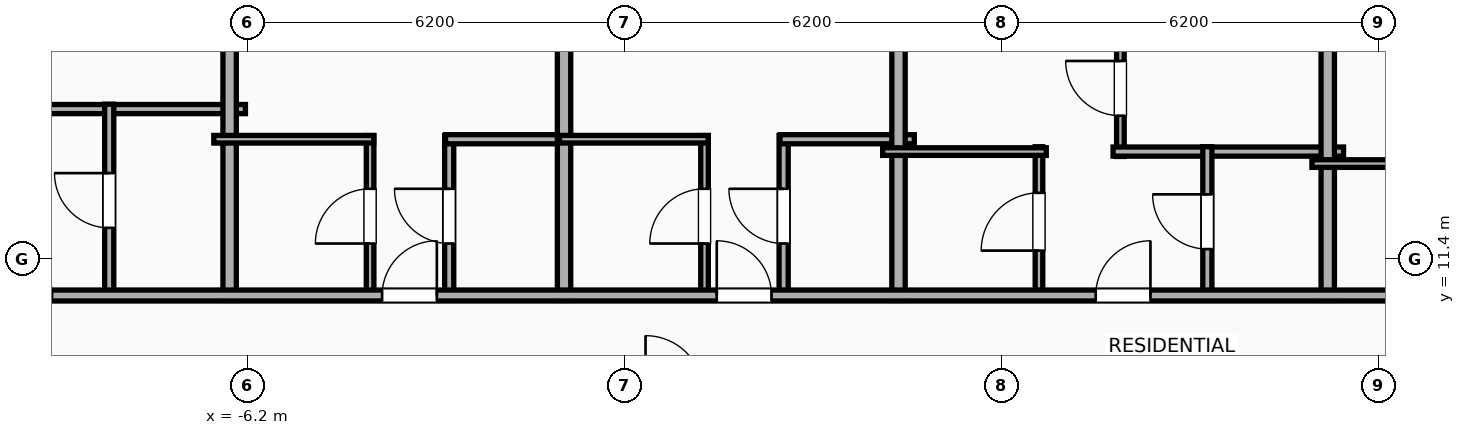
"""IFC4 building model, lengths in metres.
Left out: names, types, materials, properties, quantities, classifications, styles, units other than length and angle.
Written with IfcOpenShell. Run it as: python <this file> out.ifc"""

import sys

from ifc_helpers import new_model, si_unit, direction, frame, frame_2d, origin, place, context, subcontext, project, spatial, rectangle, extrude, element, fill, save


model = new_model("IFC4")
c1 = context("Model", 3, precision=1e-05, world=origin(), true_north=direction((0.0, 1.0)))
c2 = subcontext(c1, "Body", "Model", "MODEL_VIEW")
j1 = project(units=[si_unit("LENGTHUNIT", "METRE"), si_unit("PLANEANGLEUNIT", "RADIAN")], contexts=[c1])
p1 = place(None, origin())
s1 = spatial("IfcSite", under=j1, at=p1, CompositionType="ELEMENT")
p2 = place(p1, origin())
s2 = spatial("IfcBuilding", under=s1, at=p2, CompositionType="ELEMENT")
p3 = place(p2, frame((0.0, 0.0, 279.5)))
s3 = spatial("IfcBuildingStorey", under=s2, at=p3, CompositionType="ELEMENT", Elevation=279.5)
p4 = place(p3, frame((-10.03, 13.866, 0.0), z_axis=(0.0, 0.0, 1.0), x_axis=(1.0, 0.0, 0.0)))
e1 = element("IfcWall", 1, at=p4, inside=s3, PredefinedType="PLUMBINGWALL", context=c2, shape_type="SweptSolid", body=[
    extrude(rectangle(XDim=3.79, YDim=0.15, at=frame_2d((1.895, 0.0))), origin(), (0.0, 0.0, 1.0), 3.65),
])
p5 = place(p3, frame((-8.48, 10.78, 0.0), z_axis=(0.0, 0.0, 1.0), x_axis=(0.0, 1.0, 0.0)))
e2 = element("IfcWall", 2, at=p5, inside=s3, PredefinedType="PLUMBINGWALL", context=c2, shape_type="SweptSolid", body=[
    extrude(rectangle(XDim=3.166, YDim=0.15, at=frame_2d((1.583, 0.0))), origin(), (0.0, 0.0, 1.0), 3.65),
])
p6 = place(p5, frame((1.133, 0.0, 0.0)))
e3 = element("IfcOpeningElement", 3, at=p6, cuts=e2, PredefinedType="OPENING", context=c2, shape_type="SweptSolid", body=[
    extrude(rectangle(XDim=0.9, YDim=2.05, at=frame_2d((0.45, 1.025))), frame((0.0, 0.085, 0.0), z_axis=(0.0, -1.0, 0.0), x_axis=(1.0, 0.0, 0.0)), (0.0, 0.0, 1.0), 0.17),
])
p7 = place(p3, frame((-6.5, 10.72, 0.0), z_axis=(0.0, 0.0, 1.0), x_axis=(0.0, 1.0, 0.0)))
e4 = element("IfcWall", 4, at=p7, inside=s3, PredefinedType="PARTITIONING", context=c2, shape_type="SweptSolid", body=[
    extrude(rectangle(XDim=8.423, YDim=0.22, at=frame_2d((4.211, 0.0))), origin(), (0.0, 0.0, 1.0), 3.65),
])
p8 = place(p3, frame((-4.19, 10.78, 0.0), z_axis=(0.0, 0.0, 1.0), x_axis=(0.0, 1.0, 0.0)))
e5 = element("IfcWall", 5, at=p8, inside=s3, PredefinedType="PARTITIONING", context=c2, shape_type="SweptSolid", body=[
    extrude(rectangle(XDim=2.65, YDim=0.125, at=frame_2d((1.325, 0.0))), origin(), (0.0, 0.0, 1.0), 3.65),
])
p9 = place(p8, frame((0.875, 0.0, 0.0)))
e6 = element("IfcOpeningElement", 6, at=p9, cuts=e5, PredefinedType="OPENING", context=c2, shape_type="SweptSolid", body=[
    extrude(rectangle(XDim=0.9, YDim=2.05, at=frame_2d((0.45, 1.025))), frame((0.0, 0.073, 0.0), z_axis=(0.0, -1.0, 0.0), x_axis=(1.0, 0.0, 0.0)), (0.0, 0.0, 1.0), 0.145),
])
p10 = place(p3, frame((-2.889, 10.78, 0.0), z_axis=(0.0, 0.0, 1.0), x_axis=(0.0, 1.0, 0.0)))
e7 = element("IfcWall", 7, at=p10, inside=s3, PredefinedType="PLUMBINGWALL", context=c2, shape_type="SweptSolid", body=[
    extrude(rectangle(XDim=2.65, YDim=0.15, at=frame_2d((1.325, 0.0))), origin(), (0.0, 0.0, 1.0), 3.65),
])
p11 = place(p10, frame((0.875, 0.0, 0.0)))
e8 = element("IfcOpeningElement", 8, at=p11, cuts=e7, PredefinedType="OPENING", context=c2, shape_type="SweptSolid", body=[
    extrude(rectangle(XDim=0.9, YDim=2.05, at=frame_2d((0.45, 1.025))), frame((0.0, 0.085, 0.0), z_axis=(0.0, -1.0, 0.0), x_axis=(1.0, 0.0, 0.0)), (0.0, 0.0, 1.0), 0.17),
])
p12 = place(p3, frame((-6.76, 13.37, 0.0), z_axis=(0.0, 0.0, 1.0), x_axis=(1.0, 0.0, 0.0)))
e9 = element("IfcWall", 9, at=p12, inside=s3, PredefinedType="PARTITIONING", context=c2, shape_type="SweptSolid", body=[
    extrude(rectangle(XDim=2.63, YDim=0.125, at=frame_2d((1.315, 0.0))), origin(), (0.0, 0.0, 1.0), 3.65),
])
p13 = place(p3, frame((-2.949, 13.37, 0.0), z_axis=(0.0, 0.0, 1.0), x_axis=(1.0, 0.0, 0.0)))
e10 = element("IfcWall", 10, at=p13, inside=s3, PredefinedType="PLUMBINGWALL", context=c2, shape_type="SweptSolid", body=[
    extrude(rectangle(XDim=2.024, YDim=0.15, at=frame_2d((1.012, 0.0))), origin(), (0.0, 0.0, 1.0), 3.65),
])
p14 = place(p3, frame((-1.0, 10.72, 0.0), z_axis=(0.0, 0.0, 1.0), x_axis=(0.0, 1.0, 0.0)))
e11 = element("IfcWall", 11, at=p14, inside=s3, PredefinedType="PARTITIONING", context=c2, shape_type="SweptSolid", body=[
    extrude(rectangle(XDim=7.844, YDim=0.22, at=frame_2d((3.922, 0.0))), origin(), (0.0, 0.0, 1.0), 3.65),
])
p15 = place(p3, frame((1.31, 10.78, 0.0), z_axis=(0.0, 0.0, 1.0), x_axis=(0.0, 1.0, 0.0)))
e12 = element("IfcWall", 12, at=p15, inside=s3, PredefinedType="PARTITIONING", context=c2, shape_type="SweptSolid", body=[
    extrude(rectangle(XDim=2.65, YDim=0.125, at=frame_2d((1.325, 0.0))), origin(), (0.0, 0.0, 1.0), 3.65),
])
p16 = place(p15, frame((0.875, 0.0, 0.0)))
e13 = element("IfcOpeningElement", 13, at=p16, cuts=e12, PredefinedType="OPENING", context=c2, shape_type="SweptSolid", body=[
    extrude(rectangle(XDim=0.9, YDim=2.05, at=frame_2d((0.45, 1.025))), frame((0.0, 0.073, 0.0), z_axis=(0.0, -1.0, 0.0), x_axis=(1.0, 0.0, 0.0)), (0.0, 0.0, 1.0), 0.145),
])
p17 = place(p3, frame((2.611, 10.78, 0.0), z_axis=(0.0, 0.0, 1.0), x_axis=(0.0, 1.0, 0.0)))
e14 = element("IfcWall", 14, at=p17, inside=s3, PredefinedType="PLUMBINGWALL", context=c2, shape_type="SweptSolid", body=[
    extrude(rectangle(XDim=2.65, YDim=0.15, at=frame_2d((1.325, 0.0))), origin(), (0.0, 0.0, 1.0), 3.65),
])
p18 = place(p17, frame((0.875, 0.0, 0.0)))
e15 = element("IfcOpeningElement", 15, at=p18, cuts=e14, PredefinedType="OPENING", context=c2, shape_type="SweptSolid", body=[
    extrude(rectangle(XDim=0.9, YDim=2.05, at=frame_2d((0.45, 1.025))), frame((0.0, 0.085, 0.0), z_axis=(0.0, -1.0, 0.0), x_axis=(1.0, 0.0, 0.0)), (0.0, 0.0, 1.0), 0.17),
])
p19 = place(p3, frame((-1.075, 13.37, 0.0), z_axis=(0.0, 0.0, 1.0), x_axis=(1.0, 0.0, 0.0)))
e16 = element("IfcWall", 16, at=p19, inside=s3, PredefinedType="PARTITIONING", context=c2, shape_type="SweptSolid", body=[
    extrude(rectangle(XDim=2.445, YDim=0.125, at=frame_2d((1.223, 0.0))), origin(), (0.0, 0.0, 1.0), 3.65),
])
p20 = place(p3, frame((2.551, 13.37, 0.0), z_axis=(0.0, 0.0, 1.0), x_axis=(1.0, 0.0, 0.0)))
e17 = element("IfcWall", 17, at=p20, inside=s3, PredefinedType="PLUMBINGWALL", context=c2, shape_type="SweptSolid", body=[
    extrude(rectangle(XDim=2.209, YDim=0.15, at=frame_2d((1.104, 0.0))), origin(), (0.0, 0.0, 1.0), 3.65),
])
p21 = place(p3, frame((4.5, 10.72, 0.0), z_axis=(0.0, 0.0, 1.0), x_axis=(0.0, 1.0, 0.0)))
e18 = element("IfcWall", 18, at=p21, inside=s3, PredefinedType="PARTITIONING", context=c2, shape_type="SweptSolid", body=[
    extrude(rectangle(XDim=7.266, YDim=0.22, at=frame_2d((3.633, 0.0))), origin(), (0.0, 0.0, 1.0), 3.65),
])
p22 = place(p3, frame((8.149, 13.087, 0.0), z_axis=(0.0, 0.0, 1.0), x_axis=(0.0, 1.0, 0.0)))
e19 = element("IfcWall", 19, at=p22, inside=s3, PredefinedType="PARTITIONING", context=c2, shape_type="SweptSolid", body=[
    extrude(rectangle(XDim=4.667, YDim=0.125, at=frame_2d((2.333, 0.0))), origin(), (0.0, 0.0, 1.0), 3.65),
])
p23 = place(p22, frame((0.67, 0.0, 0.0)))
e20 = element("IfcOpeningElement", 20, at=p23, cuts=e19, PredefinedType="OPENING", context=c2, shape_type="SweptSolid", body=[
    extrude(rectangle(XDim=0.9, YDim=2.05, at=frame_2d((0.45, 1.025))), frame((0.0, 0.073, 0.0), z_axis=(0.0, -1.0, 0.0), x_axis=(1.0, 0.0, 0.0)), (0.0, 0.0, 1.0), 0.145),
])
p24 = place(p3, frame((8.029, 13.167, 0.0), z_axis=(0.0, 0.0, 1.0), x_axis=(1.0, 0.0, 0.0)))
e21 = element("IfcWall", 21, at=p24, inside=s3, PredefinedType="PLUMBINGWALL", context=c2, shape_type="SweptSolid", body=[
    extrude(rectangle(XDim=3.79, YDim=0.15, at=frame_2d((1.895, 0.0))), origin(), (0.0, 0.0, 1.0), 3.65),
])
p25 = place(p3, frame((6.81, 10.78, 0.0), z_axis=(0.0, 0.0, 1.0), x_axis=(0.0, 1.0, 0.0)))
e22 = element("IfcWall", 22, at=p25, inside=s3, PredefinedType="PARTITIONING", context=c2, shape_type="SweptSolid", body=[
    extrude(rectangle(XDim=2.467, YDim=0.125, at=frame_2d((1.233, 0.0))), origin(), (0.0, 0.0, 1.0), 3.65),
])
p26 = place(p25, frame((0.759, 0.0, 0.0)))
e23 = element("IfcOpeningElement", 23, at=p26, cuts=e22, PredefinedType="OPENING", context=c2, shape_type="SweptSolid", body=[
    extrude(rectangle(XDim=0.95, YDim=2.05, at=frame_2d((0.475, 1.025))), frame((0.0, 0.073, 0.0), z_axis=(0.0, -1.0, 0.0), x_axis=(1.0, 0.0, 0.0)), (0.0, 0.0, 1.0), 0.145),
])
p27 = place(p3, frame((4.24, 13.167, 0.0), z_axis=(0.0, 0.0, 1.0), x_axis=(1.0, 0.0, 0.0)))
e24 = element("IfcWall", 24, at=p27, inside=s3, PredefinedType="PARTITIONING", context=c2, shape_type="SweptSolid", body=[
    extrude(rectangle(XDim=2.69, YDim=0.125, at=frame_2d((1.345, 0.0))), origin(), (0.0, 0.0, 1.0), 3.65),
])
p28 = place(p3, frame((9.579, 10.78, 0.0), z_axis=(0.0, 0.0, 1.0), x_axis=(0.0, 1.0, 0.0)))
e25 = element("IfcWall", 25, at=p28, inside=s3, PredefinedType="PLUMBINGWALL", context=c2, shape_type="SweptSolid", body=[
    extrude(rectangle(XDim=2.467, YDim=0.15, at=frame_2d((1.233, 0.0))), origin(), (0.0, 0.0, 1.0), 3.65),
])
p29 = place(p28, frame((0.783, 0.0, 0.0)))
e26 = element("IfcOpeningElement", 26, at=p29, cuts=e25, PredefinedType="OPENING", context=c2, shape_type="SweptSolid", body=[
    extrude(rectangle(XDim=0.9, YDim=2.05, at=frame_2d((0.45, 1.025))), frame((0.0, 0.085, 0.0), z_axis=(0.0, -1.0, 0.0), x_axis=(1.0, 0.0, 0.0)), (0.0, 0.0, 1.0), 0.17),
])
p30 = place(p3, frame((11.559, 10.72, 0.0), z_axis=(0.0, 0.0, 1.0), x_axis=(0.0, 1.0, 0.0)))
e27 = element("IfcWall", 27, at=p30, inside=s3, PredefinedType="PARTITIONING", context=c2, shape_type="SweptSolid", body=[
    extrude(rectangle(XDim=6.524, YDim=0.22, at=frame_2d((3.262, 0.0))), origin(), (0.0, 0.0, 1.0), 3.65),
])
p31 = place(p3, frame((11.299, 12.97, 0.0), z_axis=(0.0, 0.0, 1.0), x_axis=(1.0, 0.0, 0.0)))
e28 = element("IfcWall", 28, at=p31, inside=s3, PredefinedType="PARTITIONING", context=c2, shape_type="SweptSolid", body=[
    extrude(rectangle(XDim=2.69, YDim=0.125, at=frame_2d((1.345, 0.0))), origin(), (0.0, 0.0, 1.0), 3.65),
])
p32 = place(p3, frame((-28.443, 10.8, 0.0), z_axis=(0.0, 0.0, 1.0), x_axis=(1.0, 0.0, 0.0)))
e29 = element("IfcWall", 29, at=p32, inside=s3, PredefinedType="PARTITIONING", context=c2, shape_type="SweptSolid", body=[
    extrude(rectangle(XDim=53.956, YDim=0.18, at=frame_2d((26.978, 0.0))), origin(), (0.0, 0.0, 1.0), 3.65),
])
p33 = place(p32, frame((3.213, 0.0, 0.0)))
e30 = element("IfcOpeningElement", 30, at=p33, cuts=e29, PredefinedType="OPENING", context=c2, shape_type="SweptSolid", body=[
    extrude(rectangle(XDim=1.15, YDim=2.05, at=frame_2d((0.575, 1.025))), frame((0.0, 0.1, 0.0), z_axis=(0.0, -1.0, 0.0), x_axis=(1.0, 0.0, 0.0)), (0.0, 0.0, 1.0), 0.2),
])
p34 = place(p32, frame((10.556, 0.0, 0.0)))
e31 = element("IfcOpeningElement", 31, at=p34, cuts=e29, PredefinedType="OPENING", context=c2, shape_type="SweptSolid", body=[
    extrude(rectangle(XDim=1.15, YDim=2.05, at=frame_2d((0.575, 1.025))), frame((0.0, 0.1, 0.0), z_axis=(0.0, -1.0, 0.0), x_axis=(1.0, 0.0, 0.0)), (0.0, 0.0, 1.0), 0.2),
])
p35 = place(p32, frame((17.872, 0.0, 0.0)))
e32 = element("IfcOpeningElement", 32, at=p35, cuts=e29, PredefinedType="OPENING", context=c2, shape_type="SweptSolid", body=[
    extrude(rectangle(XDim=1.15, YDim=2.05, at=frame_2d((0.575, 1.025))), frame((0.0, 0.1, 0.0), z_axis=(0.0, -1.0, 0.0), x_axis=(1.0, 0.0, 0.0)), (0.0, 0.0, 1.0), 0.2),
])
p36 = place(p32, frame((24.45, 0.0, 0.0)))
e33 = element("IfcOpeningElement", 33, at=p36, cuts=e29, PredefinedType="OPENING", context=c2, shape_type="SweptSolid", body=[
    extrude(rectangle(XDim=0.9, YDim=2.05, at=frame_2d((0.45, 1.025))), frame((0.0, 0.1, 0.0), z_axis=(0.0, -1.0, 0.0), x_axis=(1.0, 0.0, 0.0)), (0.0, 0.0, 1.0), 0.2),
])
p37 = place(p32, frame((29.954, 0.0, 0.0)))
e34 = element("IfcOpeningElement", 34, at=p37, cuts=e29, PredefinedType="OPENING", context=c2, shape_type="SweptSolid", body=[
    extrude(rectangle(XDim=0.9, YDim=2.05, at=frame_2d((0.45, 1.025))), frame((0.0, 0.1, 0.0), z_axis=(0.0, -1.0, 0.0), x_axis=(1.0, 0.0, 0.0)), (0.0, 0.0, 1.0), 0.2),
])
p38 = place(p32, frame((36.186, 0.0, 0.0)))
e35 = element("IfcOpeningElement", 35, at=p38, cuts=e29, PredefinedType="OPENING", context=c2, shape_type="SweptSolid", body=[
    extrude(rectangle(XDim=0.9, YDim=2.05, at=frame_2d((0.45, 1.025))), frame((0.0, 0.1, 0.0), z_axis=(0.0, -1.0, 0.0), x_axis=(1.0, 0.0, 0.0)), (0.0, 0.0, 1.0), 0.2),
])
p39 = place(p32, frame((43.249, 0.0, 0.0)))
e36 = element("IfcOpeningElement", 36, at=p39, cuts=e29, PredefinedType="OPENING", context=c2, shape_type="SweptSolid", body=[
    extrude(rectangle(XDim=0.9, YDim=2.05, at=frame_2d((0.45, 1.025))), frame((0.0, 0.1, 0.0), z_axis=(0.0, -1.0, 0.0), x_axis=(1.0, 0.0, 0.0)), (0.0, 0.0, 1.0), 0.2),
])
p40 = place(p32, frame((50.311, 0.0, 0.0)))
e37 = element("IfcOpeningElement", 37, at=p40, cuts=e29, PredefinedType="OPENING", context=c2, shape_type="SweptSolid", body=[
    extrude(rectangle(XDim=0.9, YDim=2.05, at=frame_2d((0.45, 1.025))), frame((0.0, 0.1, 0.0), z_axis=(0.0, -1.0, 0.0), x_axis=(1.0, 0.0, 0.0)), (0.0, 0.0, 1.0), 0.2),
])
p41 = place(p6, origin())
e38 = element("IfcDoor", 38, at=p41, inside=s3, OperationType="SINGLE_SWING_RIGHT", PredefinedType="DOOR", context=c2, shape_type="SweptSolid", body=[
    extrude(rectangle(XDim=0.9, YDim=2.05, at=frame_2d((0.45, 1.025))), frame((0.0, 0.025, 0.0), z_axis=(0.0, -1.0, 0.0), x_axis=(1.0, 0.0, 0.0)), (0.0, 0.0, 1.0), 0.05),
])
fill(e3, e38)
p42 = place(p9, origin())
e39 = element("IfcDoor", 39, at=p42, inside=s3, OperationType="SINGLE_SWING_LEFT", PredefinedType="DOOR", context=c2, shape_type="SweptSolid", body=[
    extrude(rectangle(XDim=0.9, YDim=2.05, at=frame_2d((0.45, 1.025))), frame((0.0, 0.025, 0.0), z_axis=(0.0, -1.0, 0.0), x_axis=(1.0, 0.0, 0.0)), (0.0, 0.0, 1.0), 0.05),
])
fill(e6, e39)
p43 = place(p11, origin())
e40 = element("IfcDoor", 40, at=p43, inside=s3, OperationType="SINGLE_SWING_RIGHT", PredefinedType="DOOR", context=c2, shape_type="SweptSolid", body=[
    extrude(rectangle(XDim=0.9, YDim=2.05, at=frame_2d((0.45, 1.025))), frame((0.0, 0.025, 0.0), z_axis=(0.0, -1.0, 0.0), x_axis=(1.0, 0.0, 0.0)), (0.0, 0.0, 1.0), 0.05),
])
fill(e8, e40)
p44 = place(p16, origin())
e41 = element("IfcDoor", 41, at=p44, inside=s3, OperationType="SINGLE_SWING_LEFT", PredefinedType="DOOR", context=c2, shape_type="SweptSolid", body=[
    extrude(rectangle(XDim=0.9, YDim=2.05, at=frame_2d((0.45, 1.025))), frame((0.0, 0.025, 0.0), z_axis=(0.0, -1.0, 0.0), x_axis=(1.0, 0.0, 0.0)), (0.0, 0.0, 1.0), 0.05),
])
fill(e13, e41)
p45 = place(p18, origin())
e42 = element("IfcDoor", 42, at=p45, inside=s3, OperationType="SINGLE_SWING_RIGHT", PredefinedType="DOOR", context=c2, shape_type="SweptSolid", body=[
    extrude(rectangle(XDim=0.9, YDim=2.05, at=frame_2d((0.45, 1.025))), frame((0.0, 0.025, 0.0), z_axis=(0.0, -1.0, 0.0), x_axis=(1.0, 0.0, 0.0)), (0.0, 0.0, 1.0), 0.05),
])
fill(e15, e42)
p46 = place(p23, origin())
e43 = element("IfcDoor", 43, at=p46, inside=s3, OperationType="SINGLE_SWING_RIGHT", PredefinedType="DOOR", context=c2, shape_type="SweptSolid", body=[
    extrude(rectangle(XDim=0.9, YDim=2.05, at=frame_2d((0.45, 1.025))), frame((0.0, 0.025, 0.0), z_axis=(0.0, -1.0, 0.0), x_axis=(1.0, 0.0, 0.0)), (0.0, 0.0, 1.0), 0.05),
])
fill(e20, e43)
p47 = place(p26, origin())
e44 = element("IfcDoor", 44, at=p47, inside=s3, OperationType="SINGLE_SWING_LEFT", PredefinedType="DOOR", context=c2, shape_type="SweptSolid", body=[
    extrude(rectangle(XDim=0.95, YDim=2.05, at=frame_2d((0.475, 1.025))), frame((0.0, 0.025, 0.0), z_axis=(0.0, -1.0, 0.0), x_axis=(1.0, 0.0, 0.0)), (0.0, 0.0, 1.0), 0.05),
])
fill(e23, e44)
p48 = place(p29, origin())
e45 = element("IfcDoor", 45, at=p48, inside=s3, OperationType="SINGLE_SWING_RIGHT", PredefinedType="DOOR", context=c2, shape_type="SweptSolid", body=[
    extrude(rectangle(XDim=0.9, YDim=2.05, at=frame_2d((0.45, 1.025))), frame((0.0, 0.025, 0.0), z_axis=(0.0, -1.0, 0.0), x_axis=(1.0, 0.0, 0.0)), (0.0, 0.0, 1.0), 0.05),
])
fill(e26, e45)
p49 = place(p36, origin())
e46 = element("IfcDoor", 46, at=p49, inside=s3, OperationType="SINGLE_SWING_RIGHT", PredefinedType="DOOR", context=c2, shape_type="SweptSolid", body=[
    extrude(rectangle(XDim=0.9, YDim=2.05, at=frame_2d((0.45, 1.025))), frame((0.0, 0.025, 0.0), z_axis=(0.0, -1.0, 0.0), x_axis=(1.0, 0.0, 0.0)), (0.0, 0.0, 1.0), 0.05),
])
fill(e33, e46)
p50 = place(p37, origin())
e47 = element("IfcDoor", 47, at=p50, inside=s3, OperationType="SINGLE_SWING_LEFT", PredefinedType="DOOR", context=c2, shape_type="SweptSolid", body=[
    extrude(rectangle(XDim=0.9, YDim=2.05, at=frame_2d((0.45, 1.025))), frame((0.0, 0.025, 0.0), z_axis=(0.0, -1.0, 0.0), x_axis=(1.0, 0.0, 0.0)), (0.0, 0.0, 1.0), 0.05),
])
fill(e34, e47)
p51 = place(p38, origin())
e48 = element("IfcDoor", 48, at=p51, inside=s3, OperationType="SINGLE_SWING_RIGHT", PredefinedType="DOOR", context=c2, shape_type="SweptSolid", body=[
    extrude(rectangle(XDim=0.9, YDim=2.05, at=frame_2d((0.45, 1.025))), frame((0.0, 0.025, 0.0), z_axis=(0.0, -1.0, 0.0), x_axis=(1.0, 0.0, 0.0)), (0.0, 0.0, 1.0), 0.05),
])
fill(e35, e48)
save(model, sys.argv[1])
